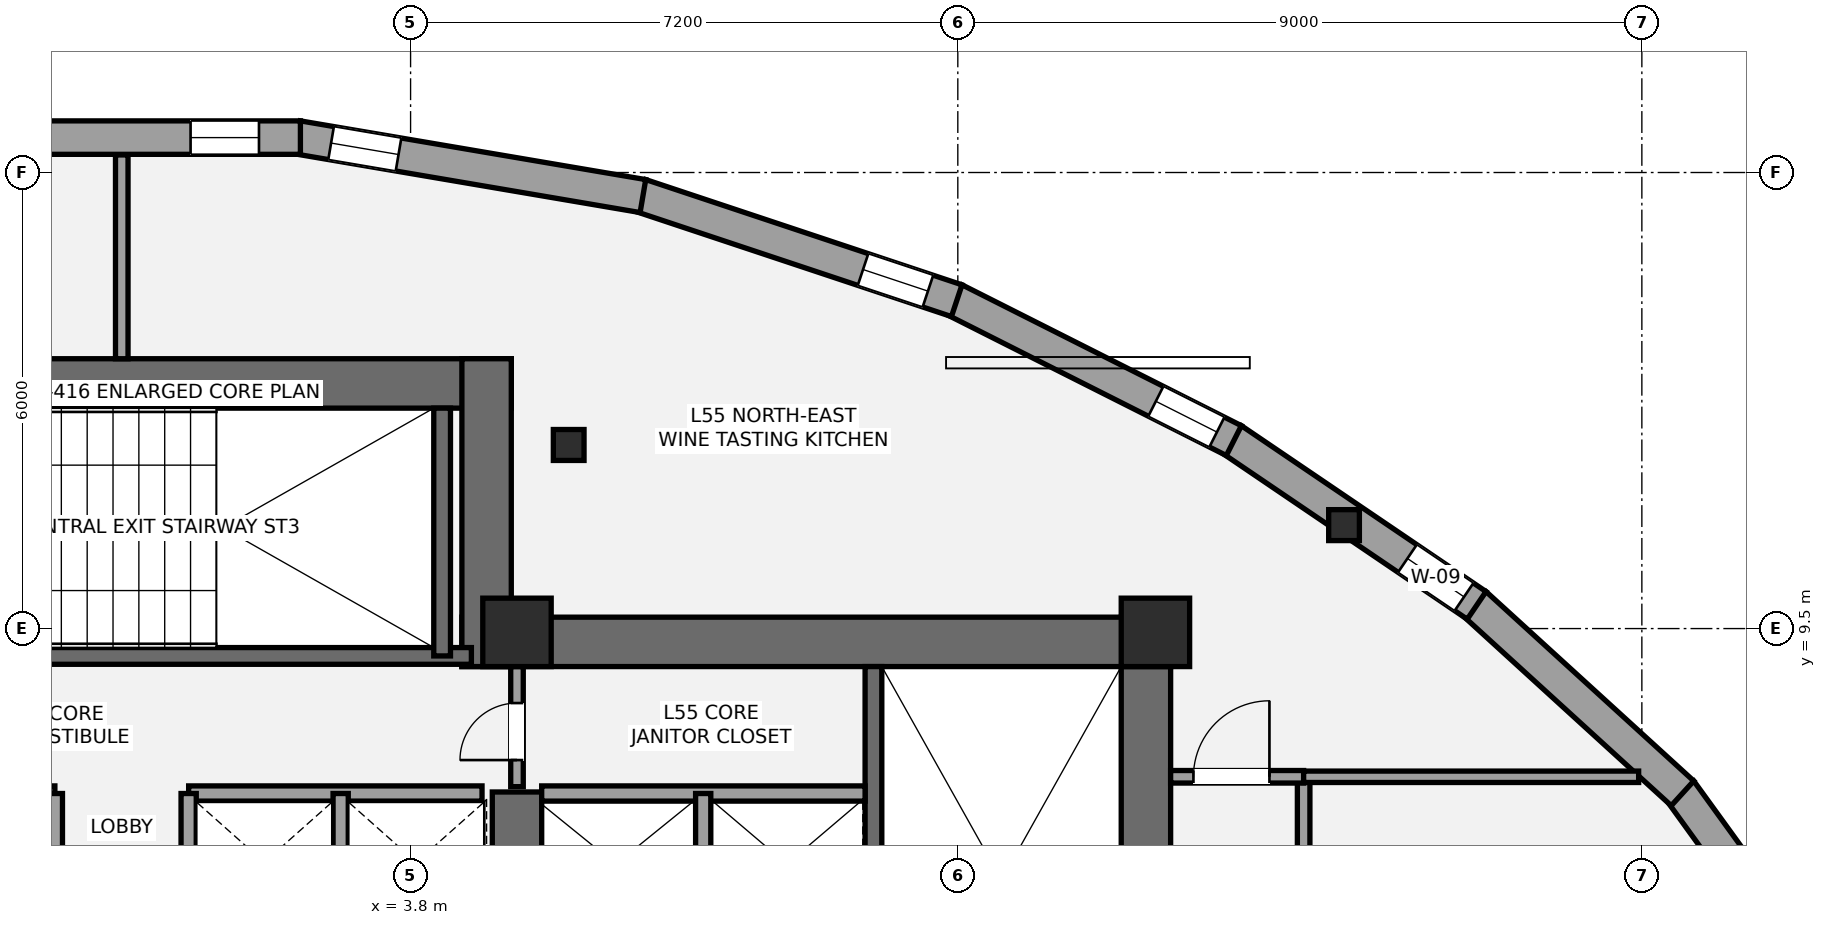
"""IFC4 building model, lengths in metres.
Left out: names, types, materials, properties, quantities, classifications, styles, units other than length and angle.
Written with IfcOpenShell. Run it as: python <this file> out.ifc"""

import sys

from ifc_helpers import new_model, si_unit, direction, frame, frame_2d, origin, origin_2d, place, context, subcontext, project, spatial, rectangle, i_section, extrude, element, fill, save


model = new_model("IFC4")
c1 = context("Model", 3, precision=1e-05, world=origin(), true_north=direction((0.0, 1.0)))
c2 = subcontext(c1, "Body", "Model", "MODEL_VIEW")
j1 = project(units=[si_unit("LENGTHUNIT", "METRE"), si_unit("PLANEANGLEUNIT", "RADIAN")], contexts=[c1])
p1 = place(None, origin())
s1 = spatial("IfcSite", under=j1, at=p1, CompositionType="ELEMENT")
p2 = place(p1, origin())
s2 = spatial("IfcBuilding", under=s1, at=p2, CompositionType="ELEMENT")
p3 = place(p2, frame((0.0, 0.0, 198.2)))
s3 = spatial("IfcBuildingStorey", under=s2, at=p3, CompositionType="ELEMENT", Elevation=198.2)
p4 = place(p3, frame((13.475, 1.2, 0.0), z_axis=(0.0, 0.0, 1.0), x_axis=(0.0, 1.0, 0.0)))
e1 = element("IfcWall", 1, at=p4, inside=s3, PredefinedType="SHEAR", context=c2, shape_type="SweptSolid", body=[
    extrude(rectangle(XDim=8.45, YDim=0.65, at=frame_2d((4.225, 0.0))), origin(), (0.0, 0.0, 1.0), 3.2),
])
p5 = place(p3, frame((4.475, 9.325, 0.0), z_axis=(0.0, 0.0, 1.0), x_axis=(1.0, 0.0, 0.0)))
e2 = element("IfcWall", 2, at=p5, inside=s3, PredefinedType="SHEAR", context=c2, shape_type="SweptSolid", body=[
    extrude(rectangle(XDim=9.325, YDim=0.65, at=frame_2d((4.663, 0.0))), origin(), (0.0, 0.0, 1.0), 3.2),
])
p6 = place(p3, frame((5.2, 5.35, 0.0), z_axis=(0.0, 0.0, 1.0), x_axis=(0.0, 1.0, 0.0)))
e3 = element("IfcWall", 3, at=p6, inside=s3, PredefinedType="SHEAR", context=c2, shape_type="SweptSolid", body=[
    extrude(rectangle(XDim=2.0, YDim=0.65, at=frame_2d((1.0, 0.0))), origin(), (0.0, 0.0, 1.0), 3.2),
])
p7 = place(p3, frame((9.89, 1.85, 0.0), z_axis=(0.0, 0.0, 1.0), x_axis=(0.0, 1.0, 0.0)))
e4 = element("IfcWall", 4, at=p7, inside=s3, PredefinedType="SHEAR", context=c2, shape_type="SweptSolid", body=[
    extrude(rectangle(XDim=7.15, YDim=0.22, at=frame_2d((3.575, 0.0))), origin(), (0.0, 0.0, 1.0), 3.2),
])
p8 = place(p3, frame((-5.125, 12.725, 0.0), z_axis=(0.0, 0.0, 1.0), x_axis=(1.0, 0.0, 0.0)))
e5 = element("IfcWall", 5, at=p8, inside=s3, PredefinedType="SHEAR", context=c2, shape_type="SweptSolid", body=[
    extrude(rectangle(XDim=10.25, YDim=0.65, at=frame_2d((5.125, 0.0))), origin(), (0.0, 0.0, 1.0), 3.2),
])
p9 = place(p3, frame((4.8, 9.0, 0.0), z_axis=(0.0, 0.0, 1.0), x_axis=(0.0, 1.0, 0.0)))
e6 = element("IfcWall", 6, at=p9, inside=s3, PredefinedType="SHEAR", context=c2, shape_type="SweptSolid", body=[
    extrude(rectangle(XDim=4.05, YDim=0.65, at=frame_2d((2.025, 0.0))), origin(), (0.0, 0.0, 1.0), 3.2),
])
p10 = place(p3, frame((-4.7, 9.14, 0.0), z_axis=(0.0, 0.0, 1.0), x_axis=(1.0, 0.0, 0.0)))
e7 = element("IfcWall", 7, at=p10, inside=s3, PredefinedType="SHEAR", context=c2, shape_type="SweptSolid", body=[
    extrude(rectangle(XDim=9.3, YDim=0.22, at=frame_2d((4.65, 0.0))), origin(), (0.0, 0.0, 1.0), 3.2),
])
p11 = place(p10, frame((1.15, 0.0, 0.0)))
e8 = element("IfcOpeningElement", 8, at=p11, cuts=e7, PredefinedType="OPENING", context=c2, shape_type="SweptSolid", body=[
    extrude(rectangle(XDim=1.05, YDim=2.15, at=frame_2d((0.525, 1.075))), frame((0.0, 0.12, 0.0), z_axis=(0.0, -1.0, 0.0), x_axis=(1.0, 0.0, 0.0)), (0.0, 0.0, 1.0), 0.24),
])
p12 = place(p3, frame((4.215, 9.14, 0.0), z_axis=(0.0, 0.0, 1.0), x_axis=(0.0, 1.0, 0.0)))
e9 = element("IfcWall", 9, at=p12, inside=s3, PredefinedType="SHEAR", context=c2, shape_type="SweptSolid", body=[
    extrude(rectangle(XDim=3.26, YDim=0.22, at=frame_2d((1.63, 0.0))), origin(), (0.0, 0.0, 1.0), 3.2),
])
for number, where, z_axis, x_axis in (
    (10, (5.2, 9.45, 0.0), (0.0, 0.0, 1.0), (1.0, 0.0, 0.0)),
    (11, (13.6, 9.45, 0.0), (0.0, 0.0, 1.0), (1.0, 0.0, 0.0)),
):
    element("IfcColumn", number, at=place(p3, frame(where, z_axis=z_axis, x_axis=x_axis)), inside=s3, PredefinedType="COLUMN", context=c2, shape_type="SweptSolid", body=[
        extrude(rectangle(XDim=0.9, YDim=0.9, at=origin_2d()), origin(), (0.0, 0.0, 1.0), 3.2),
    ])
for number, where, z_axis, x_axis in (
    (12, (16.082, 10.861, 0.0), (0.0, 0.0, 1.0), (1.0, 0.0, 0.0)),
    (13, (5.88, 11.915, 0.0), (0.0, 0.0, 1.0), (1.0, 0.0, 0.0)),
):
    element("IfcColumn", number, at=place(p3, frame(where, z_axis=z_axis, x_axis=x_axis)), inside=s3, PredefinedType="COLUMN", context=c2, shape_type="SweptSolid", body=[
        extrude(i_section(OverallWidth=0.404, OverallDepth=0.407, WebThickness=0.027, FlangeThickness=0.044, at=origin_2d()), origin(), (0.0, 0.0, 1.0), 3.2),
    ])
p13 = place(p3, frame((20.505, 7.366, 0.0), z_axis=(0.0, 0.0, 1.0), x_axis=(0.586378206793, -0.810037405678, 0.0)))
e14 = element("IfcWall", 14, at=p13, inside=s3, PredefinedType="STANDARD", context=c2, shape_type="SweptSolid", body=[
    extrude(rectangle(XDim=3.483, YDim=0.44, at=frame_2d((1.742, 0.0))), origin(), (0.0, 0.0, 1.0), 2.255),
])
p14 = place(p13, frame((2.383, 0.0, 0.42)))
e15 = element("IfcOpeningElement", 15, at=p14, cuts=e14, PredefinedType="OPENING", context=c2, shape_type="SweptSolid", body=[
    extrude(rectangle(XDim=0.9, YDim=1.35, at=frame_2d((0.45, 0.675))), frame((0.0, 0.23, 0.0), z_axis=(0.0, -1.0, 0.0), x_axis=(1.0, 0.0, 0.0)), (0.0, 0.0, 1.0), 0.46),
])
p15 = place(p3, frame((17.801, 9.824, 0.0), z_axis=(0.0, 0.0, 1.0), x_axis=(0.738992571182, -0.67371357396, 0.0)))
e16 = element("IfcWall", 16, at=p15, inside=s3, PredefinedType="STANDARD", context=c2, shape_type="SweptSolid", body=[
    extrude(rectangle(XDim=3.699, YDim=0.44, at=frame_2d((1.849, 0.0))), origin(), (0.0, 0.0, 1.0), 2.255),
])
p16 = place(p3, frame((14.607, 11.987, 0.0), z_axis=(0.0, 0.0, 1.0), x_axis=(0.827697624009, -0.561174342972, 0.0)))
e17 = element("IfcWall", 17, at=p16, inside=s3, PredefinedType="STANDARD", context=c2, shape_type="SweptSolid", body=[
    extrude(rectangle(XDim=3.888, YDim=0.44, at=frame_2d((1.944, 0.0))), origin(), (0.0, 0.0, 1.0), 2.255),
])
p17 = place(p16, frame((2.789, 0.0, 0.58)))
e18 = element("IfcOpeningElement", 18, at=p17, cuts=e17, PredefinedType="OPENING", context=c2, shape_type="SweptSolid", body=[
    extrude(rectangle(XDim=0.9, YDim=1.35, at=frame_2d((0.45, 0.675))), frame((0.0, 0.23, 0.0), z_axis=(0.0, -1.0, 0.0), x_axis=(1.0, 0.0, 0.0)), (0.0, 0.0, 1.0), 0.46),
])
p18 = place(p3, frame((10.956, 13.826, 0.0), z_axis=(0.0, 0.0, 1.0), x_axis=(0.892939479035, -0.450176728387, 0.0)))
e19 = element("IfcWall", 19, at=p18, inside=s3, PredefinedType="STANDARD", context=c2, shape_type="SweptSolid", body=[
    extrude(rectangle(XDim=4.116, YDim=0.44, at=frame_2d((2.058, 0.0))), origin(), (0.0, 0.0, 1.0), 2.255),
])
p19 = place(p18, frame((2.967, 0.0, 0.58)))
e20 = element("IfcOpeningElement", 20, at=p19, cuts=e19, PredefinedType="OPENING", context=c2, shape_type="SweptSolid", body=[
    extrude(rectangle(XDim=0.9, YDim=1.35, at=frame_2d((0.45, 0.675))), frame((0.0, 0.23, 0.0), z_axis=(0.0, -1.0, 0.0), x_axis=(1.0, 0.0, 0.0)), (0.0, 0.0, 1.0), 0.46),
])
p20 = place(p3, frame((6.824, 15.198, 0.0), z_axis=(0.0, 0.0, 1.0), x_axis=(0.94886128517, -0.315693302916, 0.0)))
e21 = element("IfcWall", 21, at=p20, inside=s3, PredefinedType="STANDARD", context=c2, shape_type="SweptSolid", body=[
    extrude(rectangle(XDim=4.386, YDim=0.44, at=frame_2d((2.193, 0.0))), origin(), (0.0, 0.0, 1.0), 2.255),
])
p21 = place(p20, frame((3.087, 0.0, 0.58)))
e22 = element("IfcOpeningElement", 22, at=p21, cuts=e21, PredefinedType="OPENING", context=c2, shape_type="SweptSolid", body=[
    extrude(rectangle(XDim=0.9, YDim=1.35, at=frame_2d((0.45, 0.675))), frame((0.0, 0.23, 0.0), z_axis=(0.0, -1.0, 0.0), x_axis=(1.0, 0.0, 0.0)), (0.0, 0.0, 1.0), 0.46),
])
p22 = place(p3, frame((2.313, 15.962, 0.0), z_axis=(0.0, 0.0, 1.0), x_axis=(0.985860485502, -0.167568204398, 0.0)))
e23 = element("IfcWall", 23, at=p22, inside=s3, PredefinedType="STANDARD", context=c2, shape_type="SweptSolid", body=[
    extrude(rectangle(XDim=4.608, YDim=0.44, at=frame_2d((2.304, 0.0))), origin(), (0.0, 0.0, 1.0), 2.255),
])
p23 = place(p22, frame((0.447, 0.0, 0.58)))
e24 = element("IfcOpeningElement", 24, at=p23, cuts=e23, PredefinedType="OPENING", context=c2, shape_type="SweptSolid", body=[
    extrude(rectangle(XDim=0.9, YDim=1.35, at=frame_2d((0.45, 0.675))), frame((0.0, 0.23, 0.0), z_axis=(0.0, -1.0, 0.0), x_axis=(1.0, 0.0, 0.0)), (0.0, 0.0, 1.0), 0.46),
])
p24 = place(p3, frame((-2.35, 15.959, 0.0), z_axis=(0.0, 0.0, 1.0), x_axis=(1.0, 0.0, 0.0)))
e25 = element("IfcWall", 25, at=p24, inside=s3, PredefinedType="STANDARD", context=c2, shape_type="SweptSolid", body=[
    extrude(rectangle(XDim=4.701, YDim=0.44, at=frame_2d((2.35, 0.0))), origin(), (0.0, 0.0, 1.0), 2.255),
])
p25 = place(p24, frame((3.256, 0.0, 0.58)))
e26 = element("IfcOpeningElement", 26, at=p25, cuts=e25, PredefinedType="OPENING", context=c2, shape_type="SweptSolid", body=[
    extrude(rectangle(XDim=0.9, YDim=1.35, at=frame_2d((0.45, 0.675))), frame((0.0, 0.23, 0.0), z_axis=(0.0, -1.0, 0.0), x_axis=(1.0, 0.0, 0.0)), (0.0, 0.0, 1.0), 0.46),
])
p26 = place(p3, frame((5.525, 7.33, 0.0), z_axis=(0.0, 0.0, 1.0), x_axis=(1.0, 0.0, 0.0)))
e27 = element("IfcWall", 27, at=p26, inside=s3, PredefinedType="SOLIDWALL", context=c2, shape_type="SweptSolid", body=[
    extrude(rectangle(XDim=4.255, YDim=0.2, at=frame_2d((2.127, 0.0))), origin(), (0.0, 0.0, 1.0), 2.96),
])
p27 = place(p3, frame((7.65, 5.47, 0.0), z_axis=(0.0, 0.0, 1.0), x_axis=(0.0, 1.0, 0.0)))
e28 = element("IfcWall", 28, at=p27, inside=s3, PredefinedType="SOLIDWALL", context=c2, shape_type="SweptSolid", body=[
    extrude(rectangle(XDim=1.86, YDim=0.2, at=frame_2d((0.93, 0.0))), origin(), (0.0, 0.0, 1.0), 2.96),
])
for number, where, z_axis, x_axis in (
    (29, (-4.74, 7.33, 0.0), (0.0, 0.0, 1.0), (1.0, 0.0, 0.0)),
    (30, (0.88, 7.33, 0.0), (0.0, 0.0, 1.0), (1.0, 0.0, 0.0)),
):
    element("IfcWall", number, at=place(p3, frame(where, z_axis=z_axis, x_axis=x_axis)), inside=s3, PredefinedType="SOLIDWALL", context=c2, shape_type="SweptSolid", body=[
        extrude(rectangle(XDim=3.86, YDim=0.2, at=frame_2d((1.93, 0.0))), origin(), (0.0, 0.0, 1.0), 2.96),
    ])
for number, where, z_axis, x_axis in (
    (31, (2.88, 5.52, 0.0), (0.0, 0.0, 1.0), (0.0, 1.0, 0.0)),
    (32, (-0.88, 5.52, 0.0), (0.0, 0.0, 1.0), (0.0, 1.0, 0.0)),
    (33, (0.88, 5.52, 0.0), (0.0, 0.0, 1.0), (0.0, 1.0, 0.0)),
):
    element("IfcWall", number, at=place(p3, frame(where, z_axis=z_axis, x_axis=x_axis)), inside=s3, PredefinedType="SOLIDWALL", context=c2, shape_type="SweptSolid", body=[
        extrude(rectangle(XDim=1.81, YDim=0.2, at=frame_2d((0.905, 0.0))), origin(), (0.0, 0.0, 1.0), 2.96),
    ])
p28 = place(p3, frame((5.2, 7.42, 0.0), z_axis=(0.0, 0.0, 1.0), x_axis=(0.0, 1.0, 0.0)))
e34 = element("IfcWall", 34, at=p28, inside=s3, PredefinedType="PARTITIONING", context=c2, shape_type="SweptSolid", body=[
    extrude(rectangle(XDim=1.58, YDim=0.165, at=frame_2d((0.79, 0.0))), origin(), (0.0, 0.0, 1.0), 2.96),
])
p29 = place(p28, frame((0.35, 0.0, 0.0)))
e35 = element("IfcOpeningElement", 35, at=p29, cuts=e34, PredefinedType="OPENING", context=c2, shape_type="SweptSolid", body=[
    extrude(rectangle(XDim=0.75, YDim=2.1, at=frame_2d((0.375, 1.05))), frame((0.0, 0.093, 0.0), z_axis=(0.0, -1.0, 0.0), x_axis=(1.0, 0.0, 0.0)), (0.0, 0.0, 1.0), 0.185),
])
p30 = place(p3, frame((15.55, -11.073, 0.0), z_axis=(0.0, 0.0, 1.0), x_axis=(0.0, 1.0, 0.0)))
e36 = element("IfcWall", 36, at=p30, inside=s3, PredefinedType="PARTITIONING", context=c2, shape_type="SweptSolid", body=[
    extrude(rectangle(XDim=18.623, YDim=0.165, at=frame_2d((9.311, 0.0))), origin(), (0.0, 0.0, 1.0), 2.413),
])
p31 = place(p30, frame((2.123, 0.0, 0.0)))
e37 = element("IfcOpeningElement", 37, at=p31, cuts=e36, PredefinedType="OPENING", context=c2, shape_type="SweptSolid", body=[
    extrude(rectangle(XDim=0.85, YDim=2.1, at=frame_2d((0.425, 1.05))), frame((0.0, 0.093, 0.0), z_axis=(0.0, -1.0, 0.0), x_axis=(1.0, 0.0, 0.0)), (0.0, 0.0, 1.0), 0.185),
])
p32 = place(p30, frame((5.333, 0.0, 0.0)))
e38 = element("IfcOpeningElement", 38, at=p32, cuts=e36, PredefinedType="OPENING", context=c2, shape_type="SweptSolid", body=[
    extrude(rectangle(XDim=1.0, YDim=2.15, at=frame_2d((0.5, 1.075))), frame((0.0, 0.093, 0.0), z_axis=(0.0, -1.0, 0.0), x_axis=(1.0, 0.0, 0.0)), (0.0, 0.0, 1.0), 0.185),
])
p33 = place(p30, frame((11.472, 0.0, 0.0)))
e39 = element("IfcOpeningElement", 39, at=p33, cuts=e36, PredefinedType="OPENING", context=c2, shape_type="SweptSolid", body=[
    extrude(rectangle(XDim=1.0, YDim=2.15, at=frame_2d((0.5, 1.075))), frame((0.0, 0.093, 0.0), z_axis=(0.0, -1.0, 0.0), x_axis=(1.0, 0.0, 0.0)), (0.0, 0.0, 1.0), 0.185),
])
p34 = place(p30, frame((15.847, 0.0, 0.0)))
e40 = element("IfcOpeningElement", 40, at=p34, cuts=e36, PredefinedType="OPENING", context=c2, shape_type="SweptSolid", body=[
    extrude(rectangle(XDim=1.0, YDim=2.15, at=frame_2d((0.5, 1.075))), frame((0.0, 0.093, 0.0), z_axis=(0.0, -1.0, 0.0), x_axis=(1.0, 0.0, 0.0)), (0.0, 0.0, 1.0), 0.185),
])
p35 = place(p3, frame((13.8, 7.55, 0.0), z_axis=(0.0, 0.0, 1.0), x_axis=(1.0, 0.0, 0.0)))
e41 = element("IfcWall", 41, at=p35, inside=s3, PredefinedType="PARTITIONING", context=c2, shape_type="SweptSolid", body=[
    extrude(rectangle(XDim=1.75, YDim=0.165, at=frame_2d((0.875, 0.0))), origin(), (0.0, 0.0, 1.0), 2.96),
])
p36 = place(p35, frame((0.3, 0.0, 0.0)))
e42 = element("IfcOpeningElement", 42, at=p36, cuts=e41, PredefinedType="OPENING", context=c2, shape_type="SweptSolid", body=[
    extrude(rectangle(XDim=1.0, YDim=2.15, at=frame_2d((0.5, 1.075))), frame((0.0, 0.093, 0.0), z_axis=(0.0, -1.0, 0.0), x_axis=(1.0, 0.0, 0.0)), (0.0, 0.0, 1.0), 0.185),
])
p37 = place(p3, frame((15.55, 7.55, 0.0), z_axis=(0.0, 0.0, 1.0), x_axis=(1.0, 0.0, 0.0)))
e43 = element("IfcWall", 43, at=p37, inside=s3, PredefinedType="PLUMBINGWALL", context=c2, shape_type="SweptSolid", body=[
    extrude(rectangle(XDim=4.408, YDim=0.15, at=frame_2d((2.204, 0.0))), origin(), (0.0, 0.0, 1.0), 2.413),
])
p38 = place(p3, frame((0.0, 13.05, 0.0), z_axis=(0.0, 0.0, 1.0), x_axis=(0.0, 1.0, 0.0)))
e44 = element("IfcWall", 44, at=p38, inside=s3, PredefinedType="PARTITIONING", context=c2, shape_type="SweptSolid", body=[
    extrude(rectangle(XDim=2.681, YDim=0.165, at=frame_2d((1.341, 0.0))), origin(), (0.0, 0.0, 1.0), 2.96),
])
p39 = place(p17, origin())
e45 = element("IfcWindow", 45, at=p39, inside=s3, PartitioningType="SINGLE_PANEL", PredefinedType="WINDOW", context=c2, shape_type="SweptSolid", body=[
    extrude(rectangle(XDim=0.9, YDim=1.35, at=frame_2d((0.45, 0.675))), frame((0.0, -0.01, 0.0), z_axis=(0.0, -1.0, 0.0), x_axis=(1.0, 0.0, 0.0)), (0.0, 0.0, 1.0), 0.06),
])
fill(e18, e45)
p40 = place(p19, origin())
e46 = element("IfcWindow", 46, at=p40, inside=s3, PartitioningType="SINGLE_PANEL", PredefinedType="WINDOW", context=c2, shape_type="SweptSolid", body=[
    extrude(rectangle(XDim=0.9, YDim=1.35, at=frame_2d((0.45, 0.675))), frame((0.0, -0.01, 0.0), z_axis=(0.0, -1.0, 0.0), x_axis=(1.0, 0.0, 0.0)), (0.0, 0.0, 1.0), 0.06),
])
fill(e20, e46)
p41 = place(p21, origin())
e47 = element("IfcWindow", 47, at=p41, inside=s3, PartitioningType="SINGLE_PANEL", PredefinedType="WINDOW", context=c2, shape_type="SweptSolid", body=[
    extrude(rectangle(XDim=0.9, YDim=1.35, at=frame_2d((0.45, 0.675))), frame((0.0, -0.01, 0.0), z_axis=(0.0, -1.0, 0.0), x_axis=(1.0, 0.0, 0.0)), (0.0, 0.0, 1.0), 0.06),
])
fill(e22, e47)
p42 = place(p23, origin())
e48 = element("IfcWindow", 48, at=p42, inside=s3, PartitioningType="SINGLE_PANEL", PredefinedType="WINDOW", context=c2, shape_type="SweptSolid", body=[
    extrude(rectangle(XDim=0.9, YDim=1.35, at=frame_2d((0.45, 0.675))), frame((0.0, -0.01, 0.0), z_axis=(0.0, -1.0, 0.0), x_axis=(1.0, 0.0, 0.0)), (0.0, 0.0, 1.0), 0.06),
])
fill(e24, e48)
p43 = place(p25, origin())
e49 = element("IfcWindow", 49, at=p43, inside=s3, PartitioningType="SINGLE_PANEL", PredefinedType="WINDOW", context=c2, shape_type="SweptSolid", body=[
    extrude(rectangle(XDim=0.9, YDim=1.35, at=frame_2d((0.45, 0.675))), frame((0.0, -0.01, 0.0), z_axis=(0.0, -1.0, 0.0), x_axis=(1.0, 0.0, 0.0)), (0.0, 0.0, 1.0), 0.06),
])
fill(e26, e49)
p44 = place(p29, origin())
e50 = element("IfcDoor", 50, at=p44, inside=s3, OperationType="SINGLE_SWING_LEFT", PredefinedType="DOOR", context=c2, shape_type="SweptSolid", body=[
    extrude(rectangle(XDim=0.75, YDim=2.1, at=frame_2d((0.375, 1.05))), frame((0.0, 0.025, 0.0), z_axis=(0.0, -1.0, 0.0), x_axis=(1.0, 0.0, 0.0)), (0.0, 0.0, 1.0), 0.05),
])
fill(e35, e50)
p45 = place(p36, origin())
e51 = element("IfcDoor", 51, at=p45, inside=s3, OperationType="SINGLE_SWING_RIGHT", PredefinedType="DOOR", context=c2, shape_type="SweptSolid", body=[
    extrude(rectangle(XDim=1.0, YDim=2.15, at=frame_2d((0.5, 1.075))), frame((0.0, 0.025, 0.0), z_axis=(0.0, -1.0, 0.0), x_axis=(1.0, 0.0, 0.0)), (0.0, 0.0, 1.0), 0.05),
])
fill(e42, e51)
save(model, sys.argv[1])
